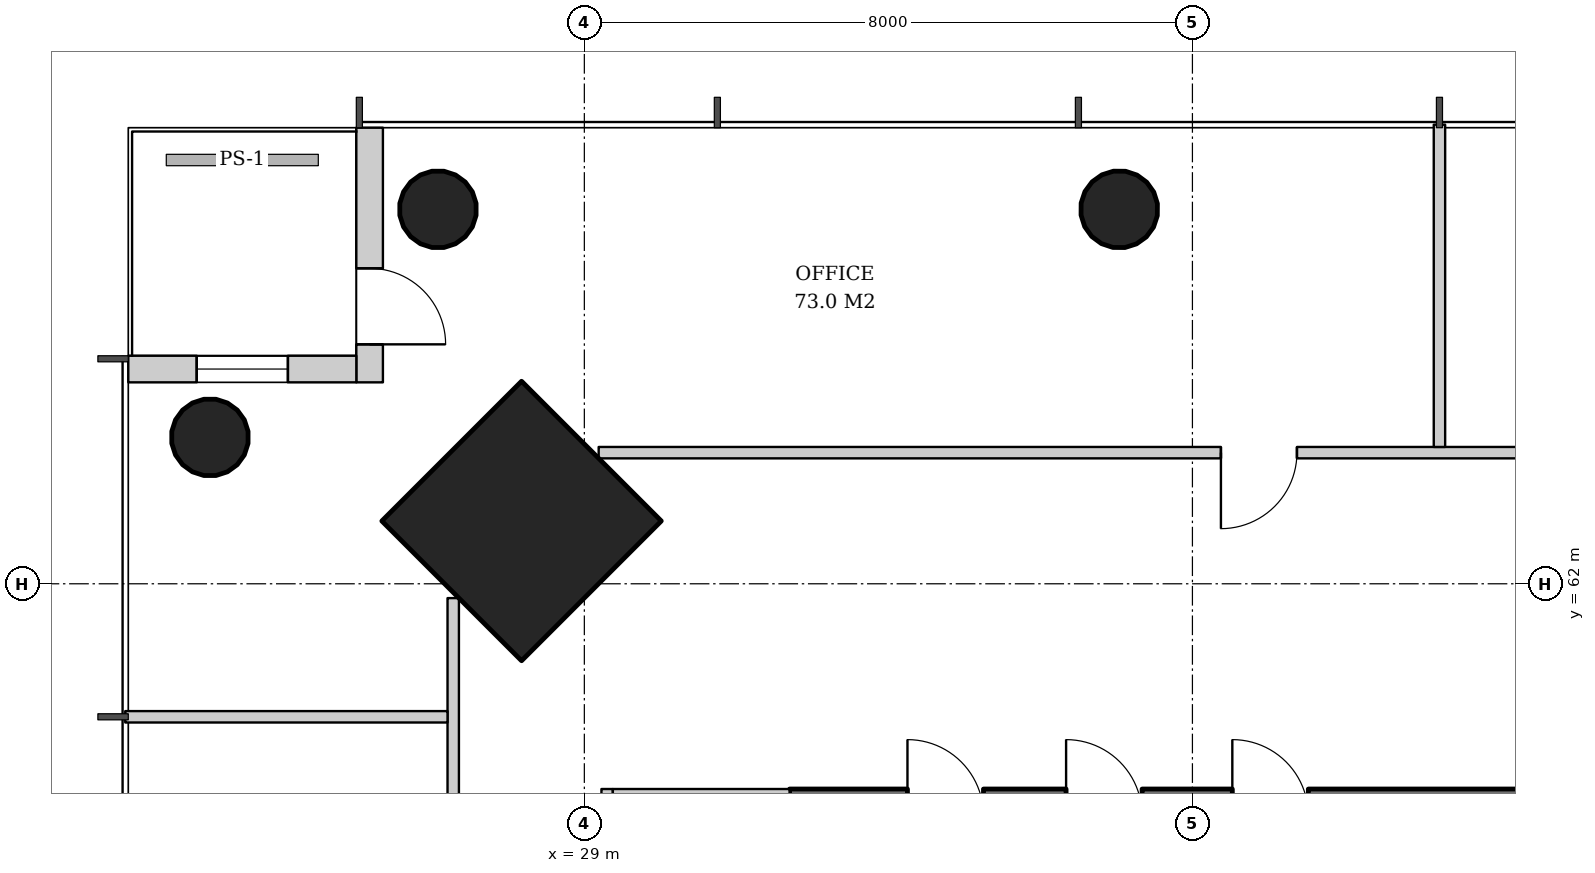
"""IFC4 building model, lengths in metres.
Left out: names, types, materials, properties, quantities, classifications, styles, units other than length and angle.
Written with IfcOpenShell. Run it as: python <this file> out.ifc"""

import sys

from ifc_helpers import new_model, si_unit, direction, frame, frame_2d, origin, origin_2d, place, context, subcontext, project, spatial, rectangle, hollow_circle, extrude, element, fill, save


model = new_model("IFC4")
c1 = context("Model", 3, precision=1e-05, world=origin(), true_north=direction((0.0, 1.0)))
c2 = subcontext(c1, "Body", "Model", "MODEL_VIEW")
j1 = project(units=[si_unit("LENGTHUNIT", "METRE"), si_unit("PLANEANGLEUNIT", "RADIAN")], contexts=[c1])
p1 = place(None, origin())
s1 = spatial("IfcSite", under=j1, at=p1, CompositionType="ELEMENT")
p2 = place(p1, origin())
s2 = spatial("IfcBuilding", under=s1, at=p2, CompositionType="ELEMENT")
p3 = place(p2, frame((0.0, 0.0, 116.0)))
s3 = spatial("IfcBuildingStorey", under=s2, at=p3, CompositionType="ELEMENT", Elevation=116.0)
p4 = place(p3, frame((28.136, 62.864, 0.0), z_axis=(0.031898107953, -0.031898107953, 0.998981992539), x_axis=(0.707106781187, 0.707106781187, 0.0)))
e1 = element("IfcColumn", 1, at=p4, inside=s3, PredefinedType="COLUMN", context=c2, shape_type="SweptSolid", body=[
    extrude(rectangle(XDim=2.6, YDim=2.6, at=origin_2d()), origin(), (0.0, 0.0, 1.0), 3.804),
])
p5 = place(p3, frame((27.036, 66.964, 0.0), z_axis=(0.031962158256, -0.031962158256, 0.998977898093), x_axis=(0.707106781187, 0.707106781187, 0.0)))
e2 = element("IfcColumn", 2, at=p5, inside=s3, PredefinedType="COLUMN", context=c2, shape_type="SweptSolid", body=[
    extrude(hollow_circle(Radius=0.508, WallThickness=0.04, at=origin_2d()), origin(), (0.0, 0.0, 1.0), 3.804),
])
p6 = place(p3, frame((36.018, 66.964, 0.0), z_axis=(0.015987204877, -0.031974409754, 0.999360818924), x_axis=(0.894427191, 0.4472135955, 0.0)))
e3 = element("IfcColumn", 3, at=p6, inside=s3, PredefinedType="COLUMN", context=c2, shape_type="SweptSolid", body=[
    extrude(hollow_circle(Radius=0.508, WallThickness=0.04, at=origin_2d()), origin(), (0.0, 0.0, 1.0), 3.802),
])
p7 = place(p3, frame((24.036, 63.964, 0.0), z_axis=(0.031962158256, -0.031962158256, 0.998977898093), x_axis=(0.707106781187, 0.707106781187, 0.0)))
e4 = element("IfcColumn", 4, at=p7, inside=s3, PredefinedType="COLUMN", context=c2, shape_type="SweptSolid", body=[
    extrude(hollow_circle(Radius=0.508, WallThickness=0.04, at=origin_2d()), origin(), (0.0, 0.0, 1.0), 3.804),
])
p8 = place(p3, frame((31.7, 58.95, 0.0), z_axis=(0.0, 0.0, 1.0), x_axis=(1.0, 0.0, 0.0)))
e5 = element("IfcWall", 5, at=p8, inside=s3, PredefinedType="SHEAR", context=c2, shape_type="SweptSolid", body=[
    extrude(rectangle(XDim=26.6, YDim=0.7, at=frame_2d((13.3, 0.0))), origin(), (0.0, 0.0, 1.0), 3.8),
])
p9 = place(p8, frame((17.94, 0.0, 0.0)))
e6 = element("IfcOpeningElement", 6, at=p9, cuts=e5, PredefinedType="OPENING", context=c2, shape_type="SweptSolid", body=[
    extrude(rectangle(XDim=1.0, YDim=2.1, at=frame_2d((0.5, 1.05))), frame((0.0, 0.36, 0.0), z_axis=(0.0, -1.0, 0.0), x_axis=(1.0, 0.0, 0.0)), (0.0, 0.0, 1.0), 0.72),
])
p10 = place(p8, frame((5.825, 0.0, 0.0)))
e7 = element("IfcOpeningElement", 7, at=p10, cuts=e5, PredefinedType="OPENING", context=c2, shape_type="SweptSolid", body=[
    extrude(rectangle(XDim=1.0, YDim=2.1, at=frame_2d((0.5, 1.05))), frame((0.0, 0.36, 0.0), z_axis=(0.0, -1.0, 0.0), x_axis=(1.0, 0.0, 0.0)), (0.0, 0.0, 1.0), 0.72),
])
p11 = place(p8, frame((1.551, 0.0, 0.0)))
e8 = element("IfcOpeningElement", 8, at=p11, cuts=e5, PredefinedType="OPENING", context=c2, shape_type="SweptSolid", body=[
    extrude(rectangle(XDim=1.0, YDim=2.1, at=frame_2d((0.5, 1.05))), frame((0.0, 0.36, 0.0), z_axis=(0.0, -1.0, 0.0), x_axis=(1.0, 0.0, 0.0)), (0.0, 0.0, 1.0), 0.72),
])
p12 = place(p8, frame((3.638, 0.0, 0.0)))
e9 = element("IfcOpeningElement", 9, at=p12, cuts=e5, PredefinedType="OPENING", context=c2, shape_type="SweptSolid", body=[
    extrude(rectangle(XDim=1.0, YDim=2.1, at=frame_2d((0.5, 1.05))), frame((0.0, 0.36, 0.0), z_axis=(0.0, -1.0, 0.0), x_axis=(1.0, 0.0, 0.0)), (0.0, 0.0, 1.0), 0.72),
])
p13 = place(p8, frame((11.577, 0.0, 0.0)))
e10 = element("IfcOpeningElement", 10, at=p13, cuts=e5, PredefinedType="OPENING", context=c2, shape_type="SweptSolid", body=[
    extrude(rectangle(XDim=1.0, YDim=2.1, at=frame_2d((0.5, 1.05))), frame((0.0, 0.36, 0.0), z_axis=(0.0, -1.0, 0.0), x_axis=(1.0, 0.0, 0.0)), (0.0, 0.0, 1.0), 0.72),
])
p14 = place(p8, frame((20.9, 0.0, 0.0)))
e11 = element("IfcOpeningElement", 11, at=p14, cuts=e5, PredefinedType="OPENING", context=c2, shape_type="SweptSolid", body=[
    extrude(rectangle(XDim=1.0, YDim=2.1, at=frame_2d((0.5, 1.05))), frame((0.0, 0.36, 0.0), z_axis=(0.0, -1.0, 0.0), x_axis=(1.0, 0.0, 0.0)), (0.0, 0.0, 1.0), 0.72),
])
p15 = place(p8, frame((23.75, 0.0, 0.0)))
e12 = element("IfcOpeningElement", 12, at=p15, cuts=e5, PredefinedType="OPENING", context=c2, shape_type="SweptSolid", body=[
    extrude(rectangle(XDim=1.0, YDim=2.1, at=frame_2d((0.5, 1.05))), frame((0.0, 0.36, 0.0), z_axis=(0.0, -1.0, 0.0), x_axis=(1.0, 0.0, 0.0)), (0.0, 0.0, 1.0), 0.72),
])
p16 = place(p3, frame((26.175, 68.0, 0.0), z_axis=(0.0, 0.0, 1.0), x_axis=(0.0, -1.0, 0.0)))
e13 = element("IfcWall", 13, at=p16, inside=s3, PredefinedType="SOLIDWALL", context=c2, shape_type="SweptSolid", body=[
    extrude(rectangle(XDim=3.35, YDim=0.35, at=frame_2d((1.675, 0.0))), origin(), (0.0, 0.0, 1.0), 3.62),
])
p17 = place(p16, frame((1.85, 0.0, 0.0)))
e14 = element("IfcOpeningElement", 14, at=p17, cuts=e13, PredefinedType="OPENING", context=c2, shape_type="SweptSolid", body=[
    extrude(rectangle(XDim=1.0, YDim=2.4, at=frame_2d((0.5, 1.2))), frame((0.0, 0.185, 0.0), z_axis=(0.0, -1.0, 0.0), x_axis=(1.0, 0.0, 0.0)), (0.0, 0.0, 1.0), 0.37),
])
p18 = place(p3, frame((26.0, 64.825, 0.0), z_axis=(0.0, 0.0, 1.0), x_axis=(-1.0, 0.0, 0.0)))
e15 = element("IfcWall", 15, at=p18, inside=s3, PredefinedType="SOLIDWALL", context=c2, shape_type="SweptSolid", body=[
    extrude(rectangle(XDim=3.0, YDim=0.35, at=frame_2d((1.5, 0.0))), origin(), (0.0, 0.0, 1.0), 3.62),
])
p19 = place(p18, frame((0.9, 0.0, 0.6)))
e16 = element("IfcOpeningElement", 16, at=p19, cuts=e15, PredefinedType="OPENING", context=c2, shape_type="SweptSolid", body=[
    extrude(rectangle(XDim=1.2, YDim=2.55, at=frame_2d((0.6, 1.275))), frame((0.0, 0.185, 0.0), z_axis=(0.0, -1.0, 0.0), x_axis=(1.0, 0.0, 0.0)), (0.0, 0.0, 1.0), 0.37),
])
p20 = place(p3, frame((29.3, 59.3, 0.0), z_axis=(0.0, 0.0, 1.0), x_axis=(0.0, -1.0, 0.0)))
e17 = element("IfcWall", 17, at=p20, inside=s3, PredefinedType="PARTITIONING", context=c2, shape_type="SweptSolid", body=[
    extrude(rectangle(XDim=5.925, YDim=0.15, at=frame_2d((2.962, 0.0))), origin(), (0.0, 0.0, 1.0), 2.72),
])
p21 = place(p20, frame((2.462, 0.0, 0.0)))
e18 = element("IfcOpeningElement", 18, at=p21, cuts=e17, PredefinedType="OPENING", context=c2, shape_type="SweptSolid", body=[
    extrude(rectangle(XDim=1.0, YDim=2.1, at=frame_2d((0.5, 1.05))), frame((0.0, 0.085, 0.0), z_axis=(0.0, -1.0, 0.0), x_axis=(1.0, 0.0, 0.0)), (0.0, 0.0, 1.0), 0.17),
])
p22 = place(p3, frame((31.7, 59.225, 0.0), z_axis=(0.0, 0.0, 1.0), x_axis=(-1.0, 0.0, 0.0)))
e19 = element("IfcWall", 19, at=p22, inside=s3, PredefinedType="PARTITIONING", context=c2, shape_type="SweptSolid", body=[
    extrude(rectangle(XDim=2.325, YDim=0.15, at=frame_2d((1.163, 0.0))), origin(), (0.0, 0.0, 1.0), 3.62),
])
p23 = place(p3, frame((60.812, 63.725, 0.0), z_axis=(0.0, 0.0, 1.0), x_axis=(-1.0, 0.0, 0.0)))
e20 = element("IfcWall", 20, at=p23, inside=s3, PredefinedType="PARTITIONING", context=c2, shape_type="SweptSolid", body=[
    extrude(rectangle(XDim=31.623, YDim=0.15, at=frame_2d((15.812, 0.0))), origin(), (0.0, 0.0, 1.0), 2.72),
])
p24 = place(p23, frame((3.437, 0.0, 0.0)))
e21 = element("IfcOpeningElement", 21, at=p24, cuts=e20, PredefinedType="OPENING", context=c2, shape_type="SweptSolid", body=[
    extrude(rectangle(XDim=1.0, YDim=2.1, at=frame_2d((0.5, 1.05))), frame((0.0, 0.085, 0.0), z_axis=(0.0, -1.0, 0.0), x_axis=(1.0, 0.0, 0.0)), (0.0, 0.0, 1.0), 0.17),
])
p25 = place(p23, frame((8.187, 0.0, 0.0)))
e22 = element("IfcOpeningElement", 22, at=p25, cuts=e20, PredefinedType="OPENING", context=c2, shape_type="SweptSolid", body=[
    extrude(rectangle(XDim=1.0, YDim=2.1, at=frame_2d((0.5, 1.05))), frame((0.0, 0.085, 0.0), z_axis=(0.0, -1.0, 0.0), x_axis=(1.0, 0.0, 0.0)), (0.0, 0.0, 1.0), 0.17),
])
p26 = place(p23, frame((12.937, 0.0, 0.0)))
e23 = element("IfcOpeningElement", 23, at=p26, cuts=e20, PredefinedType="OPENING", context=c2, shape_type="SweptSolid", body=[
    extrude(rectangle(XDim=1.0, YDim=2.1, at=frame_2d((0.5, 1.05))), frame((0.0, 0.085, 0.0), z_axis=(0.0, -1.0, 0.0), x_axis=(1.0, 0.0, 0.0)), (0.0, 0.0, 1.0), 0.17),
])
p27 = place(p23, frame((22.437, 0.0, 0.0)))
e24 = element("IfcOpeningElement", 24, at=p27, cuts=e20, PredefinedType="OPENING", context=c2, shape_type="SweptSolid", body=[
    extrude(rectangle(XDim=1.0, YDim=2.1, at=frame_2d((0.5, 1.05))), frame((0.0, 0.085, 0.0), z_axis=(0.0, -1.0, 0.0), x_axis=(1.0, 0.0, 0.0)), (0.0, 0.0, 1.0), 0.17),
])
p28 = place(p3, frame((40.25, 63.8, 0.0), z_axis=(0.0, 0.0, 1.0), x_axis=(0.0, 1.0, 0.0)))
e25 = element("IfcWall", 25, at=p28, inside=s3, PredefinedType="PARTITIONING", context=c2, shape_type="SweptSolid", body=[
    extrude(rectangle(XDim=4.24, YDim=0.15, at=frame_2d((2.12, 0.0))), origin(), (0.0, 0.0, 1.0), 2.82),
])
p29 = place(p3, frame((27.275, 61.812, 0.0), z_axis=(0.0, 0.0, 1.0), x_axis=(0.0, -1.0, 0.0)))
e26 = element("IfcWall", 26, at=p29, inside=s3, PredefinedType="PARTITIONING", context=c2, shape_type="SweptSolid", body=[
    extrude(rectangle(XDim=31.623, YDim=0.15, at=frame_2d((15.812, 0.0))), origin(), (0.0, 0.0, 1.0), 2.72),
])
p30 = place(p29, frame((3.437, 0.0, 0.0)))
e27 = element("IfcOpeningElement", 27, at=p30, cuts=e26, PredefinedType="OPENING", context=c2, shape_type="SweptSolid", body=[
    extrude(rectangle(XDim=1.0, YDim=2.1, at=frame_2d((0.5, 1.05))), frame((0.0, 0.085, 0.0), z_axis=(0.0, -1.0, 0.0), x_axis=(1.0, 0.0, 0.0)), (0.0, 0.0, 1.0), 0.17),
])
p31 = place(p29, frame((8.187, 0.0, 0.0)))
e28 = element("IfcOpeningElement", 28, at=p31, cuts=e26, PredefinedType="OPENING", context=c2, shape_type="SweptSolid", body=[
    extrude(rectangle(XDim=1.0, YDim=2.1, at=frame_2d((0.5, 1.05))), frame((0.0, 0.085, 0.0), z_axis=(0.0, -1.0, 0.0), x_axis=(1.0, 0.0, 0.0)), (0.0, 0.0, 1.0), 0.17),
])
p32 = place(p29, frame((12.937, 0.0, 0.0)))
e29 = element("IfcOpeningElement", 29, at=p32, cuts=e26, PredefinedType="OPENING", context=c2, shape_type="SweptSolid", body=[
    extrude(rectangle(XDim=1.0, YDim=2.1, at=frame_2d((0.5, 1.05))), frame((0.0, 0.085, 0.0), z_axis=(0.0, -1.0, 0.0), x_axis=(1.0, 0.0, 0.0)), (0.0, 0.0, 1.0), 0.17),
])
p33 = place(p29, frame((17.787, 0.0, 0.0)))
e30 = element("IfcOpeningElement", 30, at=p33, cuts=e26, PredefinedType="OPENING", context=c2, shape_type="SweptSolid", body=[
    extrude(rectangle(XDim=0.8, YDim=2.1, at=frame_2d((0.4, 1.05))), frame((0.0, 0.085, 0.0), z_axis=(0.0, -1.0, 0.0), x_axis=(1.0, 0.0, 0.0)), (0.0, 0.0, 1.0), 0.17),
])
p34 = place(p29, frame((22.437, 0.0, 0.0)))
e31 = element("IfcOpeningElement", 31, at=p34, cuts=e26, PredefinedType="OPENING", context=c2, shape_type="SweptSolid", body=[
    extrude(rectangle(XDim=1.0, YDim=2.1, at=frame_2d((0.5, 1.05))), frame((0.0, 0.085, 0.0), z_axis=(0.0, -1.0, 0.0), x_axis=(1.0, 0.0, 0.0)), (0.0, 0.0, 1.0), 0.17),
])
p35 = place(p29, frame((27.287, 0.0, 0.0)))
e32 = element("IfcOpeningElement", 32, at=p35, cuts=e26, PredefinedType="OPENING", context=c2, shape_type="SweptSolid", body=[
    extrude(rectangle(XDim=0.8, YDim=2.1, at=frame_2d((0.4, 1.05))), frame((0.0, 0.085, 0.0), z_axis=(0.0, -1.0, 0.0), x_axis=(1.0, 0.0, 0.0)), (0.0, 0.0, 1.0), 0.17),
])
p36 = place(p3, frame((27.2, 60.25, 0.0), z_axis=(0.0, 0.0, 1.0), x_axis=(-1.0, 0.0, 0.0)))
e33 = element("IfcWall", 33, at=p36, inside=s3, PredefinedType="PARTITIONING", context=c2, shape_type="SweptSolid", body=[
    extrude(rectangle(XDim=4.24, YDim=0.15, at=frame_2d((2.12, 0.0))), origin(), (0.0, 0.0, 1.0), 2.82),
])
p37 = place(p17, origin())
e34 = element("IfcDoor", 34, at=p37, inside=s3, OperationType="SINGLE_SWING_RIGHT", PredefinedType="DOOR", context=c2, shape_type="SweptSolid", body=[
    extrude(rectangle(XDim=1.0, YDim=2.4, at=frame_2d((0.5, 1.2))), frame((0.0, 0.025, 0.0), z_axis=(0.0, -1.0, 0.0), x_axis=(1.0, 0.0, 0.0)), (0.0, 0.0, 1.0), 0.05),
])
fill(e14, e34)
p38 = place(p19, origin())
e35 = element("IfcWindow", 35, at=p38, inside=s3, PartitioningType="SINGLE_PANEL", PredefinedType="WINDOW", context=c2, shape_type="SweptSolid", body=[
    extrude(rectangle(XDim=1.2, YDim=2.55, at=frame_2d((0.6, 1.275))), frame((0.0, 0.03, 0.0), z_axis=(0.0, -1.0, 0.0), x_axis=(1.0, 0.0, 0.0)), (0.0, 0.0, 1.0), 0.06),
])
fill(e16, e35)
p39 = place(p27, origin())
e36 = element("IfcDoor", 36, at=p39, inside=s3, OperationType="SINGLE_SWING_RIGHT", PredefinedType="DOOR", context=c2, shape_type="SweptSolid", body=[
    extrude(rectangle(XDim=1.0, YDim=2.1, at=frame_2d((0.5, 1.05))), frame((0.0, 0.025, 0.0), z_axis=(0.0, -1.0, 0.0), x_axis=(1.0, 0.0, 0.0)), (0.0, 0.0, 1.0), 0.05),
])
fill(e24, e36)
save(model, sys.argv[1])
